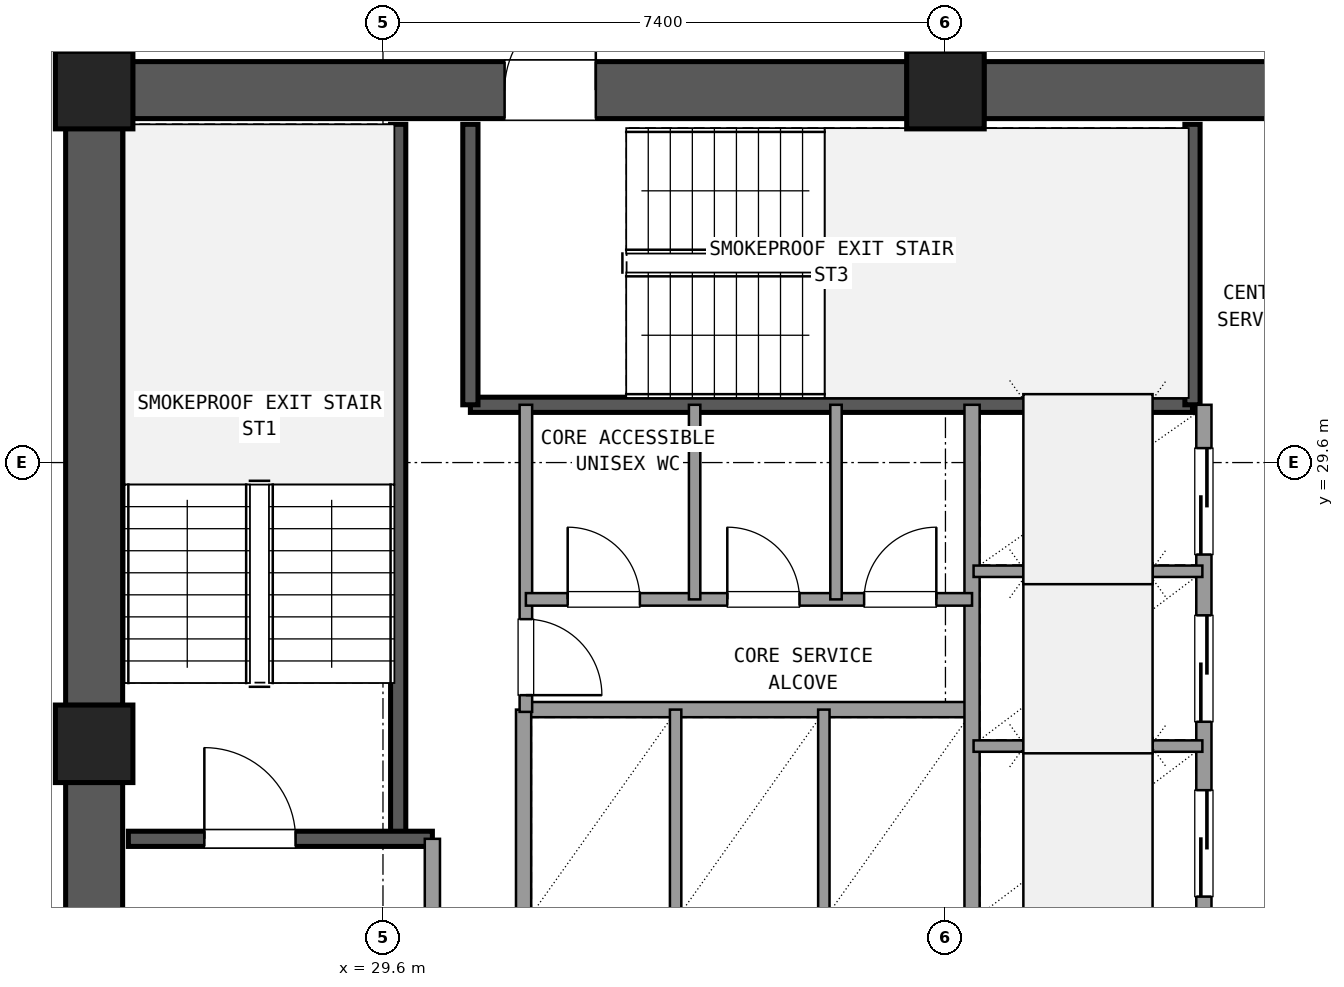
"""IFC4 building model, lengths in metres.
Left out: names, types, materials, properties, quantities, classifications, styles, units other than length and angle.
Written with IfcOpenShell. Run it as: python <this file> out.ifc"""

import sys

from ifc_helpers import new_model, si_unit, direction, frame, frame_2d, origin, origin_2d, place, context, subcontext, project, spatial, rectangle, extrude, element, fill, save


model = new_model("IFC4")
c1 = context("Model", 3, precision=1e-05, world=origin(), true_north=direction((0.0, 1.0)))
c2 = subcontext(c1, "Body", "Model", "MODEL_VIEW")
j1 = project(units=[si_unit("LENGTHUNIT", "METRE"), si_unit("PLANEANGLEUNIT", "RADIAN")], contexts=[c1])
p1 = place(None, origin())
s1 = spatial("IfcSite", under=j1, at=p1, CompositionType="ELEMENT")
p2 = place(p1, origin())
s2 = spatial("IfcBuilding", under=s1, at=p2, CompositionType="ELEMENT")
p3 = place(p2, frame((0.0, 0.0, 88.38)))
s3 = spatial("IfcBuildingStorey", under=s2, at=p3, CompositionType="ELEMENT", Elevation=88.38)
for number, where, z_axis, x_axis in (
    (1, (37.0, 34.5, 0.0), (0.0, 0.0, 1.0), (1.0, 0.0, 0.0)),
    (2, (25.8, 34.5, 0.0), (0.0, 0.0, 1.0), (1.0, 0.0, 0.0)),
    (3, (25.8, 25.9, 0.0), (0.0, 0.0, 1.0), (1.0, 0.0, 0.0)),
):
    element("IfcColumn", number, at=place(p3, frame(where, z_axis=z_axis, x_axis=x_axis)), inside=s3, PredefinedType="COLUMN", context=c2, shape_type="SweptSolid", body=[
        extrude(rectangle(XDim=1.02, YDim=1.02, at=origin_2d()), origin(), (0.0, 0.0, 1.0), 3.6),
    ])
p4 = place(p3, frame((47.695, 34.5, 0.0), z_axis=(0.0, 0.0, 1.0), x_axis=(-1.0, 0.0, 0.0)))
e4 = element("IfcWall", 4, at=p4, inside=s3, PredefinedType="SHEAR", context=c2, shape_type="SweptSolid", body=[
    extrude(rectangle(XDim=10.19, YDim=0.75, at=frame_2d((5.095, 0.0))), origin(), (0.0, 0.0, 1.0), 3.32),
])
p5 = place(p4, frame((4.595, 0.0, 0.0)))
e5 = element("IfcOpeningElement", 5, at=p5, cuts=e4, PredefinedType="OPENING", context=c2, shape_type="SweptSolid", body=[
    extrude(rectangle(XDim=1.6, YDim=2.2, at=frame_2d((0.8, 1.1))), frame((0.0, 0.385, 0.0), z_axis=(0.0, -1.0, 0.0), x_axis=(1.0, 0.0, 0.0)), (0.0, 0.0, 1.0), 0.77),
])
p6 = place(p3, frame((36.495, 34.5, 0.0), z_axis=(0.0, 0.0, 1.0), x_axis=(-1.0, 0.0, 0.0)))
e6 = element("IfcWall", 6, at=p6, inside=s3, PredefinedType="SHEAR", context=c2, shape_type="SweptSolid", body=[
    extrude(rectangle(XDim=10.19, YDim=0.75, at=frame_2d((5.095, 0.0))), origin(), (0.0, 0.0, 1.0), 3.32),
])
p7 = place(p6, frame((4.095, 0.0, 0.0)))
e7 = element("IfcOpeningElement", 7, at=p7, cuts=e6, PredefinedType="OPENING", context=c2, shape_type="SweptSolid", body=[
    extrude(rectangle(XDim=1.2, YDim=2.15, at=frame_2d((0.6, 1.075))), frame((0.0, 0.385, 0.0), z_axis=(0.0, -1.0, 0.0), x_axis=(1.0, 0.0, 0.0)), (0.0, 0.0, 1.0), 0.77),
])
p8 = place(p3, frame((25.8, 33.995, 0.0), z_axis=(0.0, 0.0, 1.0), x_axis=(0.0, -1.0, 0.0)))
e8 = element("IfcWall", 8, at=p8, inside=s3, PredefinedType="SHEAR", context=c2, shape_type="SweptSolid", body=[
    extrude(rectangle(XDim=7.59, YDim=0.75, at=frame_2d((3.795, 0.0))), origin(), (0.0, 0.0, 1.0), 3.32),
])
p9 = place(p3, frame((25.8, 25.395, 0.0), z_axis=(0.0, 0.0, 1.0), x_axis=(0.0, -1.0, 0.0)))
e9 = element("IfcWall", 9, at=p9, inside=s3, PredefinedType="SHEAR", context=c2, shape_type="SweptSolid", body=[
    extrude(rectangle(XDim=7.59, YDim=0.75, at=frame_2d((3.795, 0.0))), origin(), (0.0, 0.0, 1.0), 3.32),
])
p10 = place(p9, frame((2.145, 0.0, 0.0)))
e10 = element("IfcOpeningElement", 10, at=p10, cuts=e9, PredefinedType="OPENING", context=c2, shape_type="SweptSolid", body=[
    extrude(rectangle(XDim=1.2, YDim=2.15, at=frame_2d((0.6, 1.075))), frame((0.0, 0.385, 0.0), z_axis=(0.0, -1.0, 0.0), x_axis=(1.0, 0.0, 0.0)), (0.0, 0.0, 1.0), 0.77),
])
p11 = place(p3, frame((29.8, 24.65, 0.0), z_axis=(0.0, 0.0, 1.0), x_axis=(0.0, 1.0, 0.0)))
e11 = element("IfcWall", 11, at=p11, inside=s3, PredefinedType="SHEAR", context=c2, shape_type="SweptSolid", body=[
    extrude(rectangle(XDim=9.4, YDim=0.2, at=frame_2d((4.7, 0.0))), origin(), (0.0, 0.0, 1.0), 3.32),
])
p12 = place(p3, frame((26.25, 24.65, 0.0), z_axis=(0.0, 0.0, 1.0), x_axis=(1.0, 0.0, 0.0)))
e12 = element("IfcWall", 12, at=p12, inside=s3, PredefinedType="SHEAR", context=c2, shape_type="SweptSolid", body=[
    extrude(rectangle(XDim=4.0, YDim=0.2, at=frame_2d((2.0, 0.0))), origin(), (0.0, 0.0, 1.0), 3.32),
])
p13 = place(p12, frame((1.0, 0.0, 0.0)))
e13 = element("IfcOpeningElement", 13, at=p13, cuts=e12, PredefinedType="OPENING", context=c2, shape_type="SweptSolid", body=[
    extrude(rectangle(XDim=1.2, YDim=2.15, at=frame_2d((0.6, 1.075))), frame((0.0, 0.11, 0.0), z_axis=(0.0, -1.0, 0.0), x_axis=(1.0, 0.0, 0.0)), (0.0, 0.0, 1.0), 0.22),
])
p14 = place(p3, frame((30.75, 30.36, 0.0), z_axis=(0.0, 0.0, 1.0), x_axis=(1.0, 0.0, 0.0)))
e14 = element("IfcWall", 14, at=p14, inside=s3, PredefinedType="SHEAR", context=c2, shape_type="SweptSolid", body=[
    extrude(rectangle(XDim=9.5, YDim=0.2, at=frame_2d((4.75, 0.0))), origin(), (0.0, 0.0, 1.0), 3.32),
])
for number, where, z_axis, x_axis in (
    (15, (30.75, 30.36, 0.0), (0.0, 0.0, 1.0), (0.0, 1.0, 0.0)),
    (16, (40.25, 30.36, 0.0), (0.0, 0.0, 1.0), (0.0, 1.0, 0.0)),
):
    element("IfcWall", number, at=place(p3, frame(where, z_axis=z_axis, x_axis=x_axis)), inside=s3, PredefinedType="SHEAR", context=c2, shape_type="SweptSolid", body=[
        extrude(rectangle(XDim=3.69, YDim=0.2, at=frame_2d((1.845, 0.0))), origin(), (0.0, 0.0, 1.0), 3.32),
    ])
p15 = place(p3, frame((30.25, 17.75, 0.0), z_axis=(0.0, 0.0, 1.0), x_axis=(0.0, 1.0, 0.0)))
e17 = element("IfcWall", 17, at=p15, inside=s3, PredefinedType="SOLIDWALL", context=c2, shape_type="SweptSolid", body=[
    extrude(rectangle(XDim=6.9, YDim=0.2, at=frame_2d((3.45, 0.0))), origin(), (0.0, 0.0, 1.0), 2.61),
])
p16 = place(p15, frame((4.15, 0.0, 0.0)))
e18 = element("IfcOpeningElement", 18, at=p16, cuts=e17, PredefinedType="OPENING", context=c2, shape_type="SweptSolid", body=[
    extrude(rectangle(XDim=1.2, YDim=2.15, at=frame_2d((0.6, 1.075))), frame((0.0, 0.11, 0.0), z_axis=(0.0, -1.0, 0.0), x_axis=(1.0, 0.0, 0.0)), (0.0, 0.0, 1.0), 0.22),
])
p17 = place(p3, frame((31.45, 26.35, 0.0), z_axis=(0.0, 0.0, 1.0), x_axis=(1.0, 0.0, 0.0)))
e19 = element("IfcWall", 19, at=p17, inside=s3, PredefinedType="SOLIDWALL", context=c2, shape_type="SweptSolid", body=[
    extrude(rectangle(XDim=5.9, YDim=0.2, at=frame_2d((2.95, 0.0))), origin(), (0.0, 0.0, 1.0), 2.61),
])
p18 = place(p3, frame((31.45, 23.54, 0.0), z_axis=(0.0, 0.0, 1.0), x_axis=(0.0, 1.0, 0.0)))
e20 = element("IfcWall", 20, at=p18, inside=s3, PredefinedType="SOLIDWALL", context=c2, shape_type="SweptSolid", body=[
    extrude(rectangle(XDim=2.81, YDim=0.2, at=frame_2d((1.405, 0.0))), origin(), (0.0, 0.0, 1.0), 2.61),
])
for number, where, z_axis, x_axis in (
    (21, (33.45, 23.54, 0.0), (0.0, 0.0, 1.0), (0.0, 1.0, 0.0)),
    (22, (35.4, 23.54, 0.0), (0.0, 0.0, 1.0), (0.0, 1.0, 0.0)),
):
    element("IfcWall", number, at=place(p3, frame(where, z_axis=z_axis, x_axis=x_axis)), inside=s3, PredefinedType="PARTITIONING", context=c2, shape_type="SweptSolid", body=[
        extrude(rectangle(XDim=2.81, YDim=0.15, at=frame_2d((1.405, 0.0))), origin(), (0.0, 0.0, 1.0), 2.61),
    ])
p19 = place(p3, frame((37.35, 23.54, 0.0), z_axis=(0.0, 0.0, 1.0), x_axis=(0.0, 1.0, 0.0)))
e23 = element("IfcWall", 23, at=p19, inside=s3, PredefinedType="SOLIDWALL", context=c2, shape_type="SweptSolid", body=[
    extrude(rectangle(XDim=6.82, YDim=0.2, at=frame_2d((3.41, 0.0))), origin(), (0.0, 0.0, 1.0), 2.61),
])
p20 = place(p3, frame((40.4, 23.54, 0.0), z_axis=(0.0, 0.0, 1.0), x_axis=(0.0, 1.0, 0.0)))
e24 = element("IfcWall", 24, at=p20, inside=s3, PredefinedType="SOLIDWALL", context=c2, shape_type="SweptSolid", body=[
    extrude(rectangle(XDim=6.82, YDim=0.2, at=frame_2d((3.41, 0.0))), origin(), (0.0, 0.0, 1.0), 2.61),
])
p21 = place(p20, frame((0.35, 0.0, 0.0)))
e25 = element("IfcOpeningElement", 25, at=p21, cuts=e24, PredefinedType="OPENING", context=c2, shape_type="SweptSolid", body=[
    extrude(rectangle(XDim=1.4, YDim=2.2, at=frame_2d((0.7, 1.1))), frame((0.0, 0.11, 0.0), z_axis=(0.0, -1.0, 0.0), x_axis=(1.0, 0.0, 0.0)), (0.0, 0.0, 1.0), 0.22),
])
p22 = place(p20, frame((2.65, 0.0, 0.0)))
e26 = element("IfcOpeningElement", 26, at=p22, cuts=e24, PredefinedType="OPENING", context=c2, shape_type="SweptSolid", body=[
    extrude(rectangle(XDim=1.4, YDim=2.2, at=frame_2d((0.7, 1.1))), frame((0.0, 0.11, 0.0), z_axis=(0.0, -1.0, 0.0), x_axis=(1.0, 0.0, 0.0)), (0.0, 0.0, 1.0), 0.22),
])
p23 = place(p20, frame((4.85, 0.0, 0.0)))
e27 = element("IfcOpeningElement", 27, at=p23, cuts=e24, PredefinedType="OPENING", context=c2, shape_type="SweptSolid", body=[
    extrude(rectangle(XDim=1.4, YDim=2.2, at=frame_2d((0.7, 1.1))), frame((0.0, 0.11, 0.0), z_axis=(0.0, -1.0, 0.0), x_axis=(1.0, 0.0, 0.0)), (0.0, 0.0, 1.0), 0.22),
])
for number, where, z_axis, x_axis in (
    (28, (37.37, 25.87, 0.0), (0.0, 0.0, 1.0), (1.0, 0.0, 0.0)),
    (29, (37.37, 28.17, 0.0), (0.0, 0.0, 1.0), (1.0, 0.0, 0.0)),
):
    element("IfcWall", number, at=place(p3, frame(where, z_axis=z_axis, x_axis=x_axis)), inside=s3, PredefinedType="PARTITIONING", context=c2, shape_type="SweptSolid", body=[
        extrude(rectangle(XDim=3.01, YDim=0.15, at=frame_2d((1.505, 0.0))), origin(), (0.0, 0.0, 1.0), 2.61),
    ])
p24 = place(p3, frame((31.48, 26.32, 0.0), z_axis=(0.0, 0.0, 1.0), x_axis=(0.0, 1.0, 0.0)))
e30 = element("IfcWall", 30, at=p24, inside=s3, PredefinedType="PLUMBINGWALL", context=c2, shape_type="SweptSolid", body=[
    extrude(rectangle(XDim=4.04, YDim=0.165, at=frame_2d((2.02, 0.0))), origin(), (0.0, 0.0, 1.0), 2.61),
])
p25 = place(p24, frame((0.22, 0.0, 0.0)))
e31 = element("IfcOpeningElement", 31, at=p25, cuts=e30, PredefinedType="OPENING", context=c2, shape_type="SweptSolid", body=[
    extrude(rectangle(XDim=1.0, YDim=2.15, at=frame_2d((0.5, 1.075))), frame((0.0, 0.093, 0.0), z_axis=(0.0, -1.0, 0.0), x_axis=(1.0, 0.0, 0.0)), (0.0, 0.0, 1.0), 0.185),
])
p26 = place(p3, frame((31.48, 27.8, 0.0), z_axis=(0.0, 0.0, 1.0), x_axis=(1.0, 0.0, 0.0)))
e32 = element("IfcWall", 32, at=p26, inside=s3, PredefinedType="PLUMBINGWALL", context=c2, shape_type="SweptSolid", body=[
    extrude(rectangle(XDim=5.87, YDim=0.165, at=frame_2d((2.935, 0.0))), origin(), (0.0, 0.0, 1.0), 2.61),
])
p27 = place(p26, frame((0.55, 0.0, 0.0)))
e33 = element("IfcOpeningElement", 33, at=p27, cuts=e32, PredefinedType="OPENING", context=c2, shape_type="SweptSolid", body=[
    extrude(rectangle(XDim=0.95, YDim=2.1, at=frame_2d((0.475, 1.05))), frame((0.0, 0.093, 0.0), z_axis=(0.0, -1.0, 0.0), x_axis=(1.0, 0.0, 0.0)), (0.0, 0.0, 1.0), 0.185),
])
p28 = place(p26, frame((2.65, 0.0, 0.0)))
e34 = element("IfcOpeningElement", 34, at=p28, cuts=e32, PredefinedType="OPENING", context=c2, shape_type="SweptSolid", body=[
    extrude(rectangle(XDim=0.95, YDim=2.1, at=frame_2d((0.475, 1.05))), frame((0.0, 0.093, 0.0), z_axis=(0.0, -1.0, 0.0), x_axis=(1.0, 0.0, 0.0)), (0.0, 0.0, 1.0), 0.185),
])
p29 = place(p26, frame((4.45, 0.0, 0.0)))
e35 = element("IfcOpeningElement", 35, at=p29, cuts=e32, PredefinedType="OPENING", context=c2, shape_type="SweptSolid", body=[
    extrude(rectangle(XDim=0.95, YDim=2.1, at=frame_2d((0.475, 1.05))), frame((0.0, 0.093, 0.0), z_axis=(0.0, -1.0, 0.0), x_axis=(1.0, 0.0, 0.0)), (0.0, 0.0, 1.0), 0.185),
])
for number, where, z_axis, x_axis in (
    (36, (33.7, 27.8, 0.0), (0.0, 0.0, 1.0), (0.0, 1.0, 0.0)),
    (37, (35.56, 27.8, 0.0), (0.0, 0.0, 1.0), (0.0, 1.0, 0.0)),
):
    element("IfcWall", number, at=place(p3, frame(where, z_axis=z_axis, x_axis=x_axis)), inside=s3, PredefinedType="PARTITIONING", context=c2, shape_type="SweptSolid", body=[
        extrude(rectangle(XDim=2.56, YDim=0.15, at=frame_2d((1.28, 0.0))), origin(), (0.0, 0.0, 1.0), 2.61),
    ])
p30 = place(p3, frame((37.0, 34.95, 0.0), z_axis=(0.0, 0.0, 1.0), x_axis=(0.0, 1.0, 0.0)))
e38 = element("IfcWall", 38, at=p30, inside=s3, PredefinedType="PARTITIONING", context=c2, shape_type="SweptSolid", body=[
    extrude(rectangle(XDim=3.21, YDim=0.18, at=frame_2d((1.605, 0.0))), origin(), (0.0, 0.0, 1.0), 2.61),
])
p31 = place(p30, frame((0.605, 0.0, 0.0)))
e39 = element("IfcOpeningElement", 39, at=p31, cuts=e38, PredefinedType="OPENING", context=c2, shape_type="SweptSolid", body=[
    extrude(rectangle(XDim=2.0, YDim=2.2, at=frame_2d((1.0, 1.1))), frame((0.0, 0.1, 0.0), z_axis=(0.0, -1.0, 0.0), x_axis=(1.0, 0.0, 0.0)), (0.0, 0.0, 1.0), 0.2),
])
p32 = place(p13, origin())
e40 = element("IfcDoor", 40, at=p32, inside=s3, OperationType="SINGLE_SWING_LEFT", PredefinedType="DOOR", context=c2, shape_type="SweptSolid", body=[
    extrude(rectangle(XDim=1.2, YDim=2.15, at=frame_2d((0.6, 1.075))), frame((0.0, 0.025, 0.0), z_axis=(0.0, -1.0, 0.0), x_axis=(1.0, 0.0, 0.0)), (0.0, 0.0, 1.0), 0.05),
])
fill(e13, e40)
p33 = place(p7, frame((1.2, 0.0, 0.0), z_axis=(0.0, 0.0, 1.0), x_axis=(-1.0, 0.0, 0.0)))
e41 = element("IfcDoor", 41, at=p33, inside=s3, OperationType="SINGLE_SWING_LEFT", PredefinedType="DOOR", context=c2, shape_type="SweptSolid", body=[
    extrude(rectangle(XDim=1.2, YDim=2.15, at=frame_2d((0.6, 1.075))), frame((0.0, 0.025, 0.0), z_axis=(0.0, -1.0, 0.0), x_axis=(1.0, 0.0, 0.0)), (0.0, 0.0, 1.0), 0.05),
])
fill(e7, e41)
p34 = place(p21, origin())
e42 = element("IfcDoor", 42, at=p34, inside=s3, OperationType="SLIDING_TO_LEFT", PredefinedType="DOOR", context=c2, shape_type="SweptSolid", body=[
    extrude(rectangle(XDim=1.4, YDim=2.2, at=frame_2d((0.7, 1.1))), frame((0.0, 0.025, 0.0), z_axis=(0.0, -1.0, 0.0), x_axis=(1.0, 0.0, 0.0)), (0.0, 0.0, 1.0), 0.05),
])
fill(e25, e42)
p35 = place(p22, origin())
e43 = element("IfcDoor", 43, at=p35, inside=s3, OperationType="SLIDING_TO_LEFT", PredefinedType="DOOR", context=c2, shape_type="SweptSolid", body=[
    extrude(rectangle(XDim=1.4, YDim=2.2, at=frame_2d((0.7, 1.1))), frame((0.0, 0.025, 0.0), z_axis=(0.0, -1.0, 0.0), x_axis=(1.0, 0.0, 0.0)), (0.0, 0.0, 1.0), 0.05),
])
fill(e26, e43)
p36 = place(p23, origin())
e44 = element("IfcDoor", 44, at=p36, inside=s3, OperationType="SLIDING_TO_RIGHT", PredefinedType="DOOR", context=c2, shape_type="SweptSolid", body=[
    extrude(rectangle(XDim=1.4, YDim=2.2, at=frame_2d((0.7, 1.1))), frame((0.0, 0.025, 0.0), z_axis=(0.0, -1.0, 0.0), x_axis=(1.0, 0.0, 0.0)), (0.0, 0.0, 1.0), 0.05),
])
fill(e27, e44)
p37 = place(p25, frame((1.0, 0.0, 0.0), z_axis=(0.0, 0.0, 1.0), x_axis=(-1.0, 0.0, 0.0)))
e45 = element("IfcDoor", 45, at=p37, inside=s3, OperationType="SINGLE_SWING_LEFT", PredefinedType="DOOR", context=c2, shape_type="SweptSolid", body=[
    extrude(rectangle(XDim=1.0, YDim=2.15, at=frame_2d((0.5, 1.075))), frame((0.0, 0.025, 0.0), z_axis=(0.0, -1.0, 0.0), x_axis=(1.0, 0.0, 0.0)), (0.0, 0.0, 1.0), 0.05),
])
fill(e31, e45)
p38 = place(p27, origin())
e46 = element("IfcDoor", 46, at=p38, inside=s3, OperationType="SINGLE_SWING_LEFT", PredefinedType="DOOR", context=c2, shape_type="SweptSolid", body=[
    extrude(rectangle(XDim=0.95, YDim=2.1, at=frame_2d((0.475, 1.05))), frame((0.0, 0.025, 0.0), z_axis=(0.0, -1.0, 0.0), x_axis=(1.0, 0.0, 0.0)), (0.0, 0.0, 1.0), 0.05),
])
fill(e33, e46)
p39 = place(p28, origin())
e47 = element("IfcDoor", 47, at=p39, inside=s3, OperationType="SINGLE_SWING_LEFT", PredefinedType="DOOR", context=c2, shape_type="SweptSolid", body=[
    extrude(rectangle(XDim=0.95, YDim=2.1, at=frame_2d((0.475, 1.05))), frame((0.0, 0.025, 0.0), z_axis=(0.0, -1.0, 0.0), x_axis=(1.0, 0.0, 0.0)), (0.0, 0.0, 1.0), 0.05),
])
fill(e34, e47)
p40 = place(p29, origin())
e48 = element("IfcDoor", 48, at=p40, inside=s3, OperationType="SINGLE_SWING_RIGHT", PredefinedType="DOOR", context=c2, shape_type="SweptSolid", body=[
    extrude(rectangle(XDim=0.95, YDim=2.1, at=frame_2d((0.475, 1.05))), frame((0.0, 0.025, 0.0), z_axis=(0.0, -1.0, 0.0), x_axis=(1.0, 0.0, 0.0)), (0.0, 0.0, 1.0), 0.05),
])
fill(e35, e48)
save(model, sys.argv[1])
